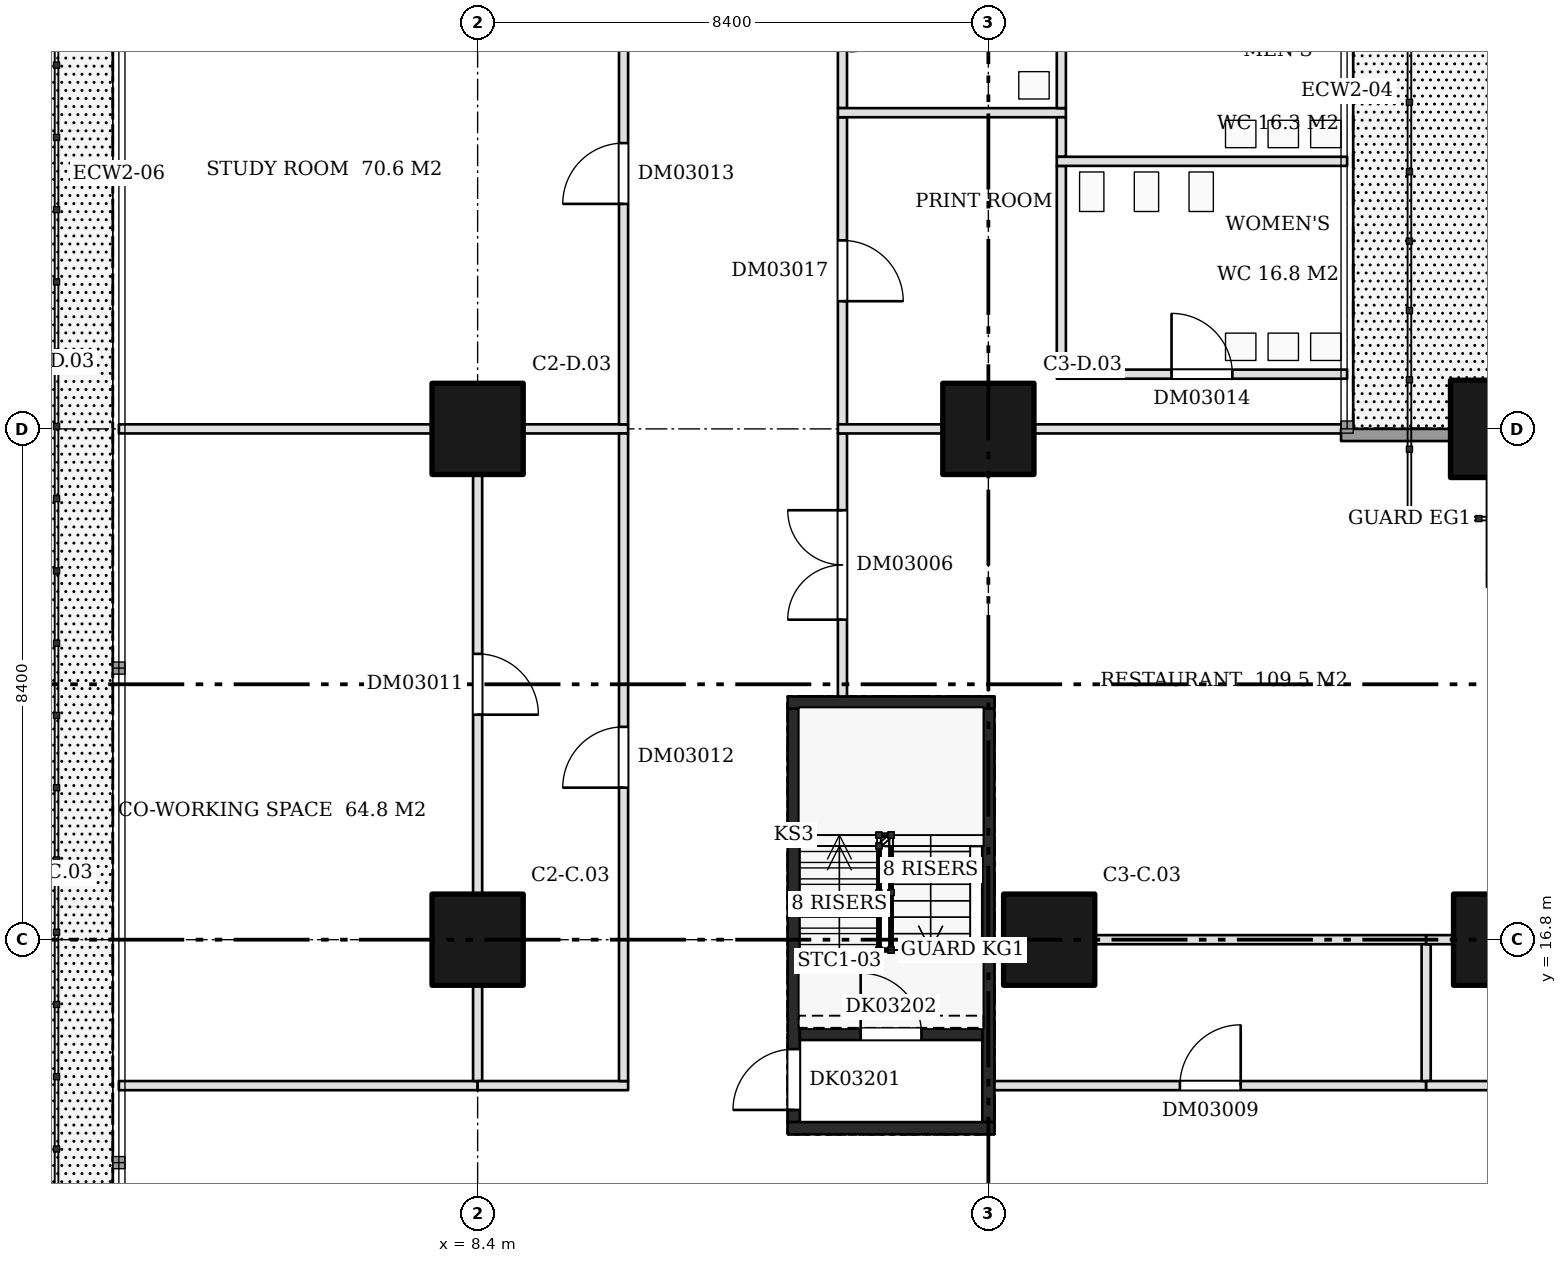
"""IFC4 building model, lengths in metres.
Left out: names, types, materials, properties, quantities, classifications, styles, units other than length and angle.
Written with IfcOpenShell. Run it as: python <this file> out.ifc"""

import sys

from ifc_helpers import new_model, si_unit, direction, frame, frame_2d, origin, origin_2d, place, context, subcontext, project, spatial, rectangle, extrude, element, fill, save


model = new_model("IFC4")
c1 = context("Model", 3, precision=1e-05, world=origin(), true_north=direction((0.0, 1.0)))
c2 = subcontext(c1, "Body", "Model", "MODEL_VIEW")
j1 = project(units=[si_unit("LENGTHUNIT", "METRE"), si_unit("PLANEANGLEUNIT", "RADIAN")], contexts=[c1])
p1 = place(None, origin())
s1 = spatial("IfcSite", under=j1, at=p1, CompositionType="ELEMENT")
p2 = place(p1, origin())
s2 = spatial("IfcBuilding", under=s1, at=p2, CompositionType="ELEMENT")
p3 = place(p2, frame((0.0, 0.0, 19.8)))
s3 = spatial("IfcBuildingStorey", under=s2, at=p3, CompositionType="ELEMENT", Elevation=19.8)
for number, where, z_axis, x_axis in (
    (1, (8.4, 16.8, 0.0), (0.0, 0.0, 1.0), (1.0, 0.0, 0.0)),
    (2, (8.4, 25.2, 0.0), (0.0, 0.0, 1.0), (1.0, 0.0, 0.0)),
    (3, (17.8, 16.8, 0.0), (0.0, 0.0, 1.0), (1.0, 0.0, 0.0)),
    (4, (16.8, 25.2, 0.0), (0.0, 0.0, 1.0), (1.0, 0.0, 0.0)),
    (5, (25.2, 16.8, 0.0), (0.0, 0.0, 1.0), (1.0, 0.0, 0.0)),
):
    element("IfcColumn", number, at=place(p3, frame(where, z_axis=z_axis, x_axis=x_axis)), inside=s3, PredefinedType="COLUMN", context=c2, shape_type="SweptSolid", body=[
        extrude(rectangle(XDim=1.5, YDim=1.5, at=origin_2d()), origin(), (0.0, 0.0, 1.0), 5.12),
    ])
p4 = place(p3, frame((25.2, 25.2, 0.0), z_axis=(0.0, 0.0, 1.0), x_axis=(1.0, 0.0, 0.0)))
e6 = element("IfcColumn", 6, at=p4, inside=s3, PredefinedType="COLUMN", context=c2, shape_type="SweptSolid", body=[
    extrude(rectangle(XDim=1.6, YDim=1.6, at=origin_2d()), origin(), (0.0, 0.0, 1.0), 5.12),
])
p5 = place(p3, frame((13.6, 13.8, 0.0), z_axis=(0.0, 0.0, 1.0), x_axis=(0.0, 1.0, 0.0)))
e7 = element("IfcWall", 7, at=p5, inside=s3, PredefinedType="SHEAR", context=c2, shape_type="SweptSolid", body=[
    extrude(rectangle(XDim=6.8, YDim=0.2, at=frame_2d((3.4, 0.0))), origin(), (0.0, 0.0, 1.0), 5.12),
])
p6 = place(p5, frame((0.2, 0.0, 0.0)))
e8 = element("IfcOpeningElement", 8, at=p6, cuts=e7, PredefinedType="OPENING", context=c2, shape_type="SweptSolid", body=[
    extrude(rectangle(XDim=1.0, YDim=2.1, at=frame_2d((0.5, 1.05))), frame((0.0, 0.11, 0.0), z_axis=(0.0, -1.0, 0.0), x_axis=(1.0, 0.0, 0.0)), (0.0, 0.0, 1.0), 0.22),
])
p7 = place(p3, frame((16.8, 13.8, 0.0), z_axis=(0.0, 0.0, 1.0), x_axis=(0.0, 1.0, 0.0)))
e9 = element("IfcWall", 9, at=p7, inside=s3, PredefinedType="SHEAR", context=c2, shape_type="SweptSolid", body=[
    extrude(rectangle(XDim=6.8, YDim=0.2, at=frame_2d((3.4, 0.0))), origin(), (0.0, 0.0, 1.0), 5.12),
])
for number, where, z_axis, x_axis in (
    (10, (13.5, 13.7, 0.0), (0.0, 0.0, 1.0), (1.0, 0.0, 0.0)),
    (11, (13.5, 20.7, 0.0), (0.0, 0.0, 1.0), (1.0, 0.0, 0.0)),
):
    element("IfcWall", number, at=place(p3, frame(where, z_axis=z_axis, x_axis=x_axis)), inside=s3, PredefinedType="SHEAR", context=c2, shape_type="SweptSolid", body=[
        extrude(rectangle(XDim=3.4, YDim=0.2, at=frame_2d((1.7, 0.0))), origin(), (0.0, 0.0, 1.0), 5.12),
    ])
p8 = place(p3, frame((13.7, 15.25, 0.0), z_axis=(0.0, 0.0, 1.0), x_axis=(1.0, 0.0, 0.0)))
e12 = element("IfcWall", 12, at=p8, inside=s3, PredefinedType="SHEAR", context=c2, shape_type="SweptSolid", body=[
    extrude(rectangle(XDim=3.0, YDim=0.2, at=frame_2d((1.5, 0.0))), origin(), (0.0, 0.0, 1.0), 5.12),
])
p9 = place(p8, frame((1.0, 0.0, 0.0)))
e13 = element("IfcOpeningElement", 13, at=p9, cuts=e12, PredefinedType="OPENING", context=c2, shape_type="SweptSolid", body=[
    extrude(rectangle(XDim=1.0, YDim=2.1, at=frame_2d((0.5, 1.05))), frame((0.0, 0.11, 0.0), z_axis=(0.0, -1.0, 0.0), x_axis=(1.0, 0.0, 0.0)), (0.0, 0.0, 1.0), 0.22),
])
p10 = place(p3, frame((2.5, 14.4, 0.0), z_axis=(0.0, 0.0, 1.0), x_axis=(1.0, 0.0, 0.0)))
e14 = element("IfcWall", 14, at=p10, inside=s3, PredefinedType="PARTITIONING", context=c2, shape_type="SweptSolid", body=[
    extrude(rectangle(XDim=5.9, YDim=0.15, at=frame_2d((2.95, 0.0))), origin(), (0.0, 0.0, 1.0), 5.12),
])
p11 = place(p3, frame((2.5, 25.2, 0.0), z_axis=(0.0, 0.0, 1.0), x_axis=(1.0, 0.0, 0.0)))
e15 = element("IfcWall", 15, at=p11, inside=s3, PredefinedType="PARTITIONING", context=c2, shape_type="SweptSolid", body=[
    extrude(rectangle(XDim=5.15, YDim=0.15, at=frame_2d((2.575, 0.0))), origin(), (0.0, 0.0, 1.0), 5.12),
])
p12 = place(p3, frame((8.4, 14.475, 0.0), z_axis=(0.0, 0.0, 1.0), x_axis=(0.0, 1.0, 0.0)))
e16 = element("IfcWall", 16, at=p12, inside=s3, PredefinedType="PARTITIONING", context=c2, shape_type="SweptSolid", body=[
    extrude(rectangle(XDim=1.575, YDim=0.15, at=frame_2d((0.788, 0.0))), origin(), (0.0, 0.0, 1.0), 5.12),
])
p13 = place(p3, frame((8.4, 17.55, 0.0), z_axis=(0.0, 0.0, 1.0), x_axis=(0.0, 1.0, 0.0)))
e17 = element("IfcWall", 17, at=p13, inside=s3, PredefinedType="PARTITIONING", context=c2, shape_type="SweptSolid", body=[
    extrude(rectangle(XDim=6.9, YDim=0.15, at=frame_2d((3.45, 0.0))), origin(), (0.0, 0.0, 1.0), 5.12),
])
p14 = place(p13, frame((2.95, 0.0, 0.0)))
e18 = element("IfcOpeningElement", 18, at=p14, cuts=e17, PredefinedType="OPENING", context=c2, shape_type="SweptSolid", body=[
    extrude(rectangle(XDim=1.0, YDim=2.1, at=frame_2d((0.5, 1.05))), frame((0.0, 0.085, 0.0), z_axis=(0.0, -1.0, 0.0), x_axis=(1.0, 0.0, 0.0)), (0.0, 0.0, 1.0), 0.17),
])
p15 = place(p3, frame((8.4, 14.4, 0.0), z_axis=(0.0, 0.0, 1.0), x_axis=(1.0, 0.0, 0.0)))
e19 = element("IfcWall", 19, at=p15, inside=s3, PredefinedType="PARTITIONING", context=c2, shape_type="SweptSolid", body=[
    extrude(rectangle(XDim=2.475, YDim=0.15, at=frame_2d((1.238, 0.0))), origin(), (0.0, 0.0, 1.0), 5.12),
])
p16 = place(p3, frame((9.15, 25.2, 0.0), z_axis=(0.0, 0.0, 1.0), x_axis=(1.0, 0.0, 0.0)))
e20 = element("IfcWall", 20, at=p16, inside=s3, PredefinedType="PARTITIONING", context=c2, shape_type="SweptSolid", body=[
    extrude(rectangle(XDim=1.725, YDim=0.15, at=frame_2d((0.863, 0.0))), origin(), (0.0, 0.0, 1.0), 5.12),
])
p17 = place(p3, frame((10.8, 14.475, 0.0), z_axis=(0.0, 0.0, 1.0), x_axis=(0.0, 1.0, 0.0)))
e21 = element("IfcWall", 21, at=p17, inside=s3, PredefinedType="PARTITIONING", context=c2, shape_type="SweptSolid", body=[
    extrude(rectangle(XDim=10.65, YDim=0.15, at=frame_2d((5.325, 0.0))), origin(), (0.0, 0.0, 1.0), 5.12),
])
p18 = place(p17, frame((4.825, 0.0, 0.0)))
e22 = element("IfcOpeningElement", 22, at=p18, cuts=e21, PredefinedType="OPENING", context=c2, shape_type="SweptSolid", body=[
    extrude(rectangle(XDim=1.0, YDim=2.1, at=frame_2d((0.5, 1.05))), frame((0.0, 0.085, 0.0), z_axis=(0.0, -1.0, 0.0), x_axis=(1.0, 0.0, 0.0)), (0.0, 0.0, 1.0), 0.17),
])
p19 = place(p3, frame((10.8, 25.275, 0.0), z_axis=(0.0, 0.0, 1.0), x_axis=(0.0, 1.0, 0.0)))
e23 = element("IfcWall", 23, at=p19, inside=s3, PredefinedType="PARTITIONING", context=c2, shape_type="SweptSolid", body=[
    extrude(rectangle(XDim=8.25, YDim=0.15, at=frame_2d((4.125, 0.0))), origin(), (0.0, 0.0, 1.0), 5.12),
])
p20 = place(p19, frame((3.625, 0.0, 0.0)))
e24 = element("IfcOpeningElement", 24, at=p20, cuts=e23, PredefinedType="OPENING", context=c2, shape_type="SweptSolid", body=[
    extrude(rectangle(XDim=1.0, YDim=2.1, at=frame_2d((0.5, 1.05))), frame((0.0, 0.085, 0.0), z_axis=(0.0, -1.0, 0.0), x_axis=(1.0, 0.0, 0.0)), (0.0, 0.0, 1.0), 0.17),
])
p21 = place(p3, frame((14.4, 20.8, 0.0), z_axis=(0.0, 0.0, 1.0), x_axis=(0.0, 1.0, 0.0)))
e25 = element("IfcWall", 25, at=p21, inside=s3, PredefinedType="PARTITIONING", context=c2, shape_type="SweptSolid", body=[
    extrude(rectangle(XDim=4.325, YDim=0.15, at=frame_2d((2.163, 0.0))), origin(), (0.0, 0.0, 1.0), 5.12),
])
p22 = place(p21, frame((1.262, 0.0, 0.0)))
e26 = element("IfcOpeningElement", 26, at=p22, cuts=e25, PredefinedType="OPENING", context=c2, shape_type="SweptSolid", body=[
    extrude(rectangle(XDim=1.8, YDim=2.1, at=frame_2d((0.9, 1.05))), frame((0.0, 0.085, 0.0), z_axis=(0.0, -1.0, 0.0), x_axis=(1.0, 0.0, 0.0)), (0.0, 0.0, 1.0), 0.17),
])
p23 = place(p3, frame((14.4, 25.275, 0.0), z_axis=(0.0, 0.0, 1.0), x_axis=(0.0, 1.0, 0.0)))
e27 = element("IfcWall", 27, at=p23, inside=s3, PredefinedType="PARTITIONING", context=c2, shape_type="SweptSolid", body=[
    extrude(rectangle(XDim=5.05, YDim=0.15, at=frame_2d((2.525, 0.0))), origin(), (0.0, 0.0, 1.0), 5.12),
])
p24 = place(p23, frame((2.025, 0.0, 0.0)))
e28 = element("IfcOpeningElement", 28, at=p24, cuts=e27, PredefinedType="OPENING", context=c2, shape_type="SweptSolid", body=[
    extrude(rectangle(XDim=1.0, YDim=2.1, at=frame_2d((0.5, 1.05))), frame((0.0, 0.085, 0.0), z_axis=(0.0, -1.0, 0.0), x_axis=(1.0, 0.0, 0.0)), (0.0, 0.0, 1.0), 0.17),
])
p25 = place(p3, frame((14.325, 25.2, 0.0), z_axis=(0.0, 0.0, 1.0), x_axis=(1.0, 0.0, 0.0)))
e29 = element("IfcWall", 29, at=p25, inside=s3, PredefinedType="PARTITIONING", context=c2, shape_type="SweptSolid", body=[
    extrude(rectangle(XDim=1.725, YDim=0.15, at=frame_2d((0.863, 0.0))), origin(), (0.0, 0.0, 1.0), 5.12),
])
p26 = place(p3, frame((17.55, 25.2, 0.0), z_axis=(0.0, 0.0, 1.0), x_axis=(1.0, 0.0, 0.0)))
e30 = element("IfcWall", 30, at=p26, inside=s3, PredefinedType="PARTITIONING", context=c2, shape_type="SweptSolid", body=[
    extrude(rectangle(XDim=5.15, YDim=0.15, at=frame_2d((2.575, 0.0))), origin(), (0.0, 0.0, 1.0), 5.12),
])
p27 = place(p3, frame((14.4, 30.475, 0.0), z_axis=(0.0, 0.0, 1.0), x_axis=(0.0, 1.0, 0.0)))
e31 = element("IfcWall", 31, at=p27, inside=s3, PredefinedType="PARTITIONING", context=c2, shape_type="SweptSolid", body=[
    extrude(rectangle(XDim=1.85, YDim=0.15, at=frame_2d((0.925, 0.0))), origin(), (0.0, 0.0, 1.0), 5.12),
])
p28 = place(p3, frame((14.325, 30.4, 0.0), z_axis=(0.0, 0.0, 1.0), x_axis=(1.0, 0.0, 0.0)))
e32 = element("IfcWall", 32, at=p28, inside=s3, PredefinedType="PARTITIONING", context=c2, shape_type="SweptSolid", body=[
    extrude(rectangle(XDim=3.75, YDim=0.15, at=frame_2d((1.875, 0.0))), origin(), (0.0, 0.0, 1.0), 5.12),
])
p29 = place(p3, frame((16.9, 14.4, 0.0), z_axis=(0.0, 0.0, 1.0), x_axis=(1.0, 0.0, 0.0)))
e33 = element("IfcWall", 33, at=p29, inside=s3, PredefinedType="PARTITIONING", context=c2, shape_type="SweptSolid", body=[
    extrude(rectangle(XDim=7.1, YDim=0.15, at=frame_2d((3.55, 0.0))), origin(), (0.0, 0.0, 1.0), 5.12),
])
p30 = place(p29, frame((3.05, 0.0, 0.0)))
e34 = element("IfcOpeningElement", 34, at=p30, cuts=e33, PredefinedType="OPENING", context=c2, shape_type="SweptSolid", body=[
    extrude(rectangle(XDim=1.0, YDim=2.1, at=frame_2d((0.5, 1.05))), frame((0.0, 0.085, 0.0), z_axis=(0.0, -1.0, 0.0), x_axis=(1.0, 0.0, 0.0)), (0.0, 0.0, 1.0), 0.17),
])
p31 = place(p3, frame((18.55, 16.8, 0.0), z_axis=(0.0, 0.0, 1.0), x_axis=(1.0, 0.0, 0.0)))
e35 = element("IfcWall", 35, at=p31, inside=s3, PredefinedType="PARTITIONING", context=c2, shape_type="SweptSolid", body=[
    extrude(rectangle(XDim=5.45, YDim=0.15, at=frame_2d((2.725, 0.0))), origin(), (0.0, 0.0, 1.0), 5.12),
])
p32 = place(p3, frame((18.0, 26.175, 0.0), z_axis=(0.0, 0.0, 1.0), x_axis=(0.0, 1.0, 0.0)))
e36 = element("IfcWall", 36, at=p32, inside=s3, PredefinedType="PARTITIONING", context=c2, shape_type="SweptSolid", body=[
    extrude(rectangle(XDim=3.35, YDim=0.15, at=frame_2d((1.675, 0.0))), origin(), (0.0, 0.0, 1.0), 5.12),
])
p33 = place(p3, frame((17.925, 26.1, 0.0), z_axis=(0.0, 0.0, 1.0), x_axis=(1.0, 0.0, 0.0)))
e37 = element("IfcWall", 37, at=p33, inside=s3, PredefinedType="PARTITIONING", context=c2, shape_type="SweptSolid", body=[
    extrude(rectangle(XDim=4.775, YDim=0.15, at=frame_2d((2.387, 0.0))), origin(), (0.0, 0.0, 1.0), 5.12),
])
p34 = place(p33, frame((1.887, 0.0, 0.0)))
e38 = element("IfcOpeningElement", 38, at=p34, cuts=e37, PredefinedType="OPENING", context=c2, shape_type="SweptSolid", body=[
    extrude(rectangle(XDim=1.0, YDim=2.1, at=frame_2d((0.5, 1.05))), frame((0.0, 0.085, 0.0), z_axis=(0.0, -1.0, 0.0), x_axis=(1.0, 0.0, 0.0)), (0.0, 0.0, 1.0), 0.17),
])
p35 = place(p3, frame((18.0, 29.675, 0.0), z_axis=(0.0, 0.0, 1.0), x_axis=(0.0, 1.0, 0.0)))
e39 = element("IfcWall", 39, at=p35, inside=s3, PredefinedType="PARTITIONING", context=c2, shape_type="SweptSolid", body=[
    extrude(rectangle(XDim=0.65, YDim=0.15, at=frame_2d((0.325, 0.0))), origin(), (0.0, 0.0, 1.0), 5.12),
])
p36 = place(p3, frame((17.925, 29.6, 0.0), z_axis=(0.0, 0.0, 1.0), x_axis=(1.0, 0.0, 0.0)))
e40 = element("IfcWall", 40, at=p36, inside=s3, PredefinedType="PARTITIONING", context=c2, shape_type="SweptSolid", body=[
    extrude(rectangle(XDim=4.775, YDim=0.15, at=frame_2d((2.387, 0.0))), origin(), (0.0, 0.0, 1.0), 5.12),
])
p37 = place(p3, frame((18.0, 30.475, 0.0), z_axis=(0.0, 0.0, 1.0), x_axis=(0.0, 1.0, 0.0)))
e41 = element("IfcWall", 41, at=p37, inside=s3, PredefinedType="PARTITIONING", context=c2, shape_type="SweptSolid", body=[
    extrude(rectangle(XDim=1.85, YDim=0.15, at=frame_2d((0.925, 0.0))), origin(), (0.0, 0.0, 1.0), 5.12),
])
p38 = place(p3, frame((24.0, 14.475, 0.0), z_axis=(0.0, 0.0, 1.0), x_axis=(0.0, 1.0, 0.0)))
e42 = element("IfcWall", 42, at=p38, inside=s3, PredefinedType="PARTITIONING", context=c2, shape_type="SweptSolid", body=[
    extrude(rectangle(XDim=2.25, YDim=0.15, at=frame_2d((1.125, 0.0))), origin(), (0.0, 0.0, 1.0), 5.12),
])
p39 = place(p3, frame((24.0, 14.4, 0.0), z_axis=(0.0, 0.0, 1.0), x_axis=(1.0, 0.0, 0.0)))
e43 = element("IfcWall", 43, at=p39, inside=s3, PredefinedType="PARTITIONING", context=c2, shape_type="SweptSolid", body=[
    extrude(rectangle(XDim=12.075, YDim=0.15, at=frame_2d((6.038, 0.0))), origin(), (0.0, 0.0, 1.0), 5.12),
])
p40 = place(p39, frame((5.538, 0.0, 0.0)))
e44 = element("IfcOpeningElement", 44, at=p40, cuts=e43, PredefinedType="OPENING", context=c2, shape_type="SweptSolid", body=[
    extrude(rectangle(XDim=1.0, YDim=2.1, at=frame_2d((0.5, 1.05))), frame((0.0, 0.085, 0.0), z_axis=(0.0, -1.0, 0.0), x_axis=(1.0, 0.0, 0.0)), (0.0, 0.0, 1.0), 0.17),
])
p41 = place(p3, frame((24.0, 16.8, 0.0), z_axis=(0.0, 0.0, 1.0), x_axis=(1.0, 0.0, 0.0)))
e45 = element("IfcWall", 45, at=p41, inside=s3, PredefinedType="PARTITIONING", context=c2, shape_type="SweptSolid", body=[
    extrude(rectangle(XDim=0.45, YDim=0.15, at=frame_2d((0.225, 0.0))), origin(), (0.0, 0.0, 1.0), 5.12),
])
p42 = place(p3, frame((25.2, 22.7, 0.0), z_axis=(0.0, 0.0, 1.0), x_axis=(-1.0, 0.0, 0.0)))
e46 = element("IfcWall", 46, at=p42, inside=s3, PredefinedType="SOLIDWALL", context=c2, shape_type="SweptSolid", body=[
    extrude(rectangle(XDim=0.2, YDim=0.2, at=frame_2d((0.1, 0.0))), origin(), (0.0, 0.0, 1.0), 5.12),
])
p43 = place(p3, frame((24.4, 25.1, 0.0), z_axis=(0.0, 0.0, 1.0), x_axis=(-1.0, 0.0, 0.0)))
e47 = element("IfcWall", 47, at=p43, inside=s3, PredefinedType="SOLIDWALL", context=c2, shape_type="SweptSolid", body=[
    extrude(rectangle(XDim=1.8, YDim=0.2, at=frame_2d((0.9, 0.0))), origin(), (0.0, 0.0, 1.0), 5.12),
])
p44 = place(p6, origin())
e48 = element("IfcDoor", 48, at=p44, inside=s3, OperationType="SINGLE_SWING_LEFT", PredefinedType="DOOR", context=c2, shape_type="SweptSolid", body=[
    extrude(rectangle(XDim=1.0, YDim=2.1, at=frame_2d((0.5, 1.05))), frame((0.0, 0.025, 0.0), z_axis=(0.0, -1.0, 0.0), x_axis=(1.0, 0.0, 0.0)), (0.0, 0.0, 1.0), 0.05),
])
fill(e8, e48)
p45 = place(p9, origin())
e49 = element("IfcDoor", 49, at=p45, inside=s3, OperationType="SINGLE_SWING_LEFT", PredefinedType="DOOR", context=c2, shape_type="SweptSolid", body=[
    extrude(rectangle(XDim=1.0, YDim=2.1, at=frame_2d((0.5, 1.05))), frame((0.0, 0.025, 0.0), z_axis=(0.0, -1.0, 0.0), x_axis=(1.0, 0.0, 0.0)), (0.0, 0.0, 1.0), 0.05),
])
fill(e13, e49)
p46 = place(p22, origin())
e50 = element("IfcDoor", 50, at=p46, inside=s3, OperationType="DOUBLE_DOOR_SINGLE_SWING", PredefinedType="DOOR", context=c2, shape_type="SweptSolid", body=[
    extrude(rectangle(XDim=1.8, YDim=2.1, at=frame_2d((0.9, 1.05))), frame((0.0, 0.025, 0.0), z_axis=(0.0, -1.0, 0.0), x_axis=(1.0, 0.0, 0.0)), (0.0, 0.0, 1.0), 0.05),
])
fill(e26, e50)
p47 = place(p30, origin())
e51 = element("IfcDoor", 51, at=p47, inside=s3, OperationType="SINGLE_SWING_RIGHT", PredefinedType="DOOR", context=c2, shape_type="SweptSolid", body=[
    extrude(rectangle(XDim=1.0, YDim=2.1, at=frame_2d((0.5, 1.05))), frame((0.0, 0.025, 0.0), z_axis=(0.0, -1.0, 0.0), x_axis=(1.0, 0.0, 0.0)), (0.0, 0.0, 1.0), 0.05),
])
fill(e34, e51)
p48 = place(p14, frame((1.0, 0.0, 0.0), z_axis=(0.0, 0.0, 1.0), x_axis=(-1.0, 0.0, 0.0)))
e52 = element("IfcDoor", 52, at=p48, inside=s3, OperationType="SINGLE_SWING_RIGHT", PredefinedType="DOOR", context=c2, shape_type="SweptSolid", body=[
    extrude(rectangle(XDim=1.0, YDim=2.1, at=frame_2d((0.5, 1.05))), frame((0.0, 0.025, 0.0), z_axis=(0.0, -1.0, 0.0), x_axis=(1.0, 0.0, 0.0)), (0.0, 0.0, 1.0), 0.05),
])
fill(e18, e52)
p49 = place(p18, origin())
e53 = element("IfcDoor", 53, at=p49, inside=s3, OperationType="SINGLE_SWING_LEFT", PredefinedType="DOOR", context=c2, shape_type="SweptSolid", body=[
    extrude(rectangle(XDim=1.0, YDim=2.1, at=frame_2d((0.5, 1.05))), frame((0.0, 0.025, 0.0), z_axis=(0.0, -1.0, 0.0), x_axis=(1.0, 0.0, 0.0)), (0.0, 0.0, 1.0), 0.05),
])
fill(e22, e53)
p50 = place(p20, origin())
e54 = element("IfcDoor", 54, at=p50, inside=s3, OperationType="SINGLE_SWING_LEFT", PredefinedType="DOOR", context=c2, shape_type="SweptSolid", body=[
    extrude(rectangle(XDim=1.0, YDim=2.1, at=frame_2d((0.5, 1.05))), frame((0.0, 0.025, 0.0), z_axis=(0.0, -1.0, 0.0), x_axis=(1.0, 0.0, 0.0)), (0.0, 0.0, 1.0), 0.05),
])
fill(e24, e54)
p51 = place(p34, origin())
e55 = element("IfcDoor", 55, at=p51, inside=s3, OperationType="SINGLE_SWING_LEFT", PredefinedType="DOOR", context=c2, shape_type="SweptSolid", body=[
    extrude(rectangle(XDim=1.0, YDim=2.1, at=frame_2d((0.5, 1.05))), frame((0.0, 0.025, 0.0), z_axis=(0.0, -1.0, 0.0), x_axis=(1.0, 0.0, 0.0)), (0.0, 0.0, 1.0), 0.05),
])
fill(e38, e55)
p52 = place(p24, frame((1.0, 0.0, 0.0), z_axis=(0.0, 0.0, 1.0), x_axis=(-1.0, 0.0, 0.0)))
e56 = element("IfcDoor", 56, at=p52, inside=s3, OperationType="SINGLE_SWING_RIGHT", PredefinedType="DOOR", context=c2, shape_type="SweptSolid", body=[
    extrude(rectangle(XDim=1.0, YDim=2.1, at=frame_2d((0.5, 1.05))), frame((0.0, 0.025, 0.0), z_axis=(0.0, -1.0, 0.0), x_axis=(1.0, 0.0, 0.0)), (0.0, 0.0, 1.0), 0.05),
])
fill(e28, e56)
save(model, sys.argv[1])
